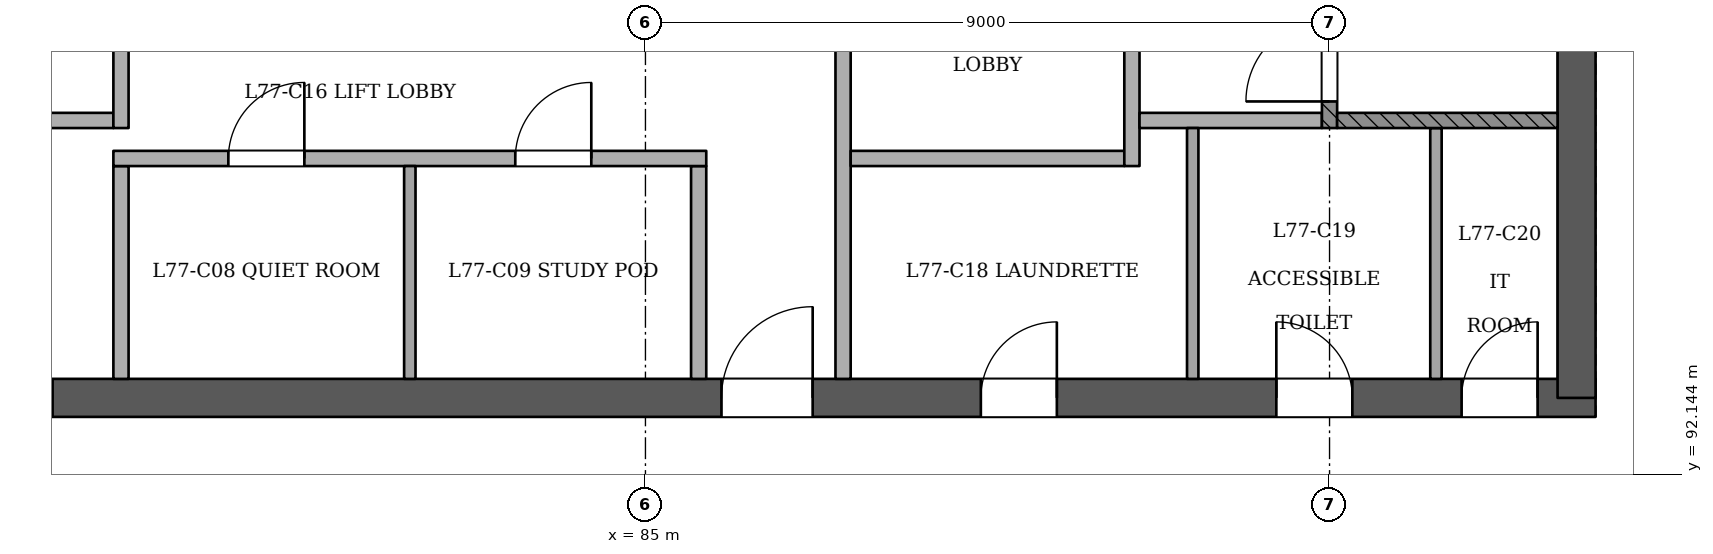
"""IFC4 building model, lengths in metres.
Left out: names, types, materials, properties, quantities, classifications, styles, units other than length and angle.
Written with IfcOpenShell. Run it as: python <this file> out.ifc"""

import sys

from ifc_helpers import new_model, si_unit, direction, frame, frame_2d, origin, place, context, subcontext, project, spatial, rectangle, extrude, element, fill, save


model = new_model("IFC4")
c1 = context("Model", 3, precision=1e-05, world=origin(), true_north=direction((0.0, 1.0)))
c2 = subcontext(c1, "Body", "Model", "MODEL_VIEW")
j1 = project(units=[si_unit("LENGTHUNIT", "METRE"), si_unit("PLANEANGLEUNIT", "RADIAN")], contexts=[c1])
p1 = place(None, origin())
s1 = spatial("IfcSite", under=j1, at=p1, CompositionType="ELEMENT")
p2 = place(p1, origin())
s2 = spatial("IfcBuilding", under=s1, at=p2, CompositionType="ELEMENT")
p3 = place(p2, frame((0.0, 0.0, 298.6)))
s3 = spatial("IfcBuildingStorey", under=s2, at=p3, CompositionType="ELEMENT", Elevation=298.6)
p4 = place(p3, frame((72.75, 93.15, 0.0), z_axis=(0.0, 0.0, 1.0), x_axis=(1.0, 0.0, 0.0)))
e1 = element("IfcWall", 1, at=p4, inside=s3, PredefinedType="SHEAR", context=c2, shape_type="SweptSolid", body=[
    extrude(rectangle(XDim=24.75, YDim=0.5, at=frame_2d((12.375, 0.0))), origin(), (0.0, 0.0, 1.0), 3.6),
])
p5 = place(p4, frame((1.05, 0.0, 0.0)))
e2 = element("IfcOpeningElement", 2, at=p5, cuts=e1, PredefinedType="OPENING", context=c2, shape_type="SweptSolid", body=[
    extrude(rectangle(XDim=1.2, YDim=2.1, at=frame_2d((0.6, 1.05))), frame((0.0, 0.26, 0.0), z_axis=(0.0, -1.0, 0.0), x_axis=(1.0, 0.0, 0.0)), (0.0, 0.0, 1.0), 0.521),
])
p6 = place(p4, frame((3.25, 0.0, 0.0)))
e3 = element("IfcOpeningElement", 3, at=p6, cuts=e1, PredefinedType="OPENING", context=c2, shape_type="SweptSolid", body=[
    extrude(rectangle(XDim=1.2, YDim=2.1, at=frame_2d((0.6, 1.05))), frame((0.0, 0.26, 0.0), z_axis=(0.0, -1.0, 0.0), x_axis=(1.0, 0.0, 0.0)), (0.0, 0.0, 1.0), 0.521),
])
p7 = place(p4, frame((13.25, 0.0, 0.0)))
e4 = element("IfcOpeningElement", 4, at=p7, cuts=e1, PredefinedType="OPENING", context=c2, shape_type="SweptSolid", body=[
    extrude(rectangle(XDim=1.2, YDim=2.1, at=frame_2d((0.6, 1.05))), frame((0.0, 0.26, 0.0), z_axis=(0.0, -1.0, 0.0), x_axis=(1.0, 0.0, 0.0)), (0.0, 0.0, 1.0), 0.521),
])
p8 = place(p4, frame((16.663, 0.0, 0.0)))
e5 = element("IfcOpeningElement", 5, at=p8, cuts=e1, PredefinedType="OPENING", context=c2, shape_type="SweptSolid", body=[
    extrude(rectangle(XDim=1.0, YDim=2.1, at=frame_2d((0.5, 1.05))), frame((0.0, 0.26, 0.0), z_axis=(0.0, -1.0, 0.0), x_axis=(1.0, 0.0, 0.0)), (0.0, 0.0, 1.0), 0.521),
])
p9 = place(p4, frame((20.55, 0.0, 0.0)))
e6 = element("IfcOpeningElement", 6, at=p9, cuts=e1, PredefinedType="OPENING", context=c2, shape_type="SweptSolid", body=[
    extrude(rectangle(XDim=1.0, YDim=2.1, at=frame_2d((0.5, 1.05))), frame((0.0, 0.26, 0.0), z_axis=(0.0, -1.0, 0.0), x_axis=(1.0, 0.0, 0.0)), (0.0, 0.0, 1.0), 0.521),
])
p10 = place(p4, frame((22.988, 0.0, 0.0)))
e7 = element("IfcOpeningElement", 7, at=p10, cuts=e1, PredefinedType="OPENING", context=c2, shape_type="SweptSolid", body=[
    extrude(rectangle(XDim=1.0, YDim=2.1, at=frame_2d((0.5, 1.05))), frame((0.0, 0.26, 0.0), z_axis=(0.0, -1.0, 0.0), x_axis=(1.0, 0.0, 0.0)), (0.0, 0.0, 1.0), 0.521),
])
p11 = place(p3, frame((97.25, 93.15, 0.0), z_axis=(0.0, 0.0, 1.0), x_axis=(0.0, 1.0, 0.0)))
e8 = element("IfcWall", 8, at=p11, inside=s3, PredefinedType="SHEAR", context=c2, shape_type="SweptSolid", body=[
    extrude(rectangle(XDim=10.75, YDim=0.5, at=frame_2d((5.375, 0.0))), origin(), (0.0, 0.0, 1.0), 3.6),
])
p12 = place(p3, frame((78.1, 93.4, 0.0), z_axis=(0.0, 0.0, 1.0), x_axis=(0.0, 1.0, 0.0)))
e9 = element("IfcWall", 9, at=p12, inside=s3, PredefinedType="PARTITIONING", context=c2, shape_type="SweptSolid", body=[
    extrude(rectangle(XDim=2.8, YDim=0.2, at=frame_2d((1.4, 0.0))), origin(), (0.0, 0.0, 1.0), 3.2),
])
p13 = place(p3, frame((81.9, 93.4, 0.0), z_axis=(0.0, 0.0, 1.0), x_axis=(0.0, 1.0, 0.0)))
e10 = element("IfcWall", 10, at=p13, inside=s3, PredefinedType="PARTITIONING", context=c2, shape_type="SweptSolid", body=[
    extrude(rectangle(XDim=2.8, YDim=0.15, at=frame_2d((1.4, 0.0))), origin(), (0.0, 0.0, 1.0), 3.2),
])
p14 = place(p3, frame((85.7, 93.4, 0.0), z_axis=(0.0, 0.0, 1.0), x_axis=(0.0, 1.0, 0.0)))
e11 = element("IfcWall", 11, at=p14, inside=s3, PredefinedType="PARTITIONING", context=c2, shape_type="SweptSolid", body=[
    extrude(rectangle(XDim=2.8, YDim=0.2, at=frame_2d((1.4, 0.0))), origin(), (0.0, 0.0, 1.0), 3.2),
])
p15 = place(p3, frame((87.6, 93.4, 0.0), z_axis=(0.0, 0.0, 1.0), x_axis=(0.0, 1.0, 0.0)))
e12 = element("IfcWall", 12, at=p15, inside=s3, PredefinedType="PARTITIONING", context=c2, shape_type="SweptSolid", body=[
    extrude(rectangle(XDim=7.0, YDim=0.2, at=frame_2d((3.5, 0.0))), origin(), (0.0, 0.0, 1.0), 3.2),
])
p16 = place(p15, frame((4.45, 0.0, 0.0)))
e13 = element("IfcOpeningElement", 13, at=p16, cuts=e12, PredefinedType="OPENING", context=c2, shape_type="SweptSolid", body=[
    extrude(rectangle(XDim=1.1, YDim=2.1, at=frame_2d((0.55, 1.05))), frame((0.0, 0.11, 0.0), z_axis=(0.0, -1.0, 0.0), x_axis=(1.0, 0.0, 0.0)), (0.0, 0.0, 1.0), 0.221),
])
for number, where, z_axis, x_axis in (
    (14, (92.2, 93.4, 0.0), (0.0, 0.0, 1.0), (0.0, 1.0, 0.0)),
    (15, (95.4, 93.4, 0.0), (0.0, 0.0, 1.0), (0.0, 1.0, 0.0)),
):
    element("IfcWall", number, at=place(p3, frame(where, z_axis=z_axis, x_axis=x_axis)), inside=s3, PredefinedType="PARTITIONING", context=c2, shape_type="SweptSolid", body=[
        extrude(rectangle(XDim=3.3, YDim=0.15, at=frame_2d((1.65, 0.0))), origin(), (0.0, 0.0, 1.0), 3.2),
    ])
p17 = place(p3, frame((78.0, 96.3, 0.0), z_axis=(0.0, 0.0, 1.0), x_axis=(1.0, 0.0, 0.0)))
e16 = element("IfcWall", 16, at=p17, inside=s3, PredefinedType="PARTITIONING", context=c2, shape_type="SweptSolid", body=[
    extrude(rectangle(XDim=7.8, YDim=0.2, at=frame_2d((3.9, 0.0))), origin(), (0.0, 0.0, 1.0), 3.2),
])
p18 = place(p17, frame((1.512, 0.0, 0.0)))
e17 = element("IfcOpeningElement", 17, at=p18, cuts=e16, PredefinedType="OPENING", context=c2, shape_type="SweptSolid", body=[
    extrude(rectangle(XDim=1.0, YDim=2.1, at=frame_2d((0.5, 1.05))), frame((0.0, 0.11, 0.0), z_axis=(0.0, -1.0, 0.0), x_axis=(1.0, 0.0, 0.0)), (0.0, 0.0, 1.0), 0.221),
])
p19 = place(p17, frame((5.288, 0.0, 0.0)))
e18 = element("IfcOpeningElement", 18, at=p19, cuts=e16, PredefinedType="OPENING", context=c2, shape_type="SweptSolid", body=[
    extrude(rectangle(XDim=1.0, YDim=2.1, at=frame_2d((0.5, 1.05))), frame((0.0, 0.11, 0.0), z_axis=(0.0, -1.0, 0.0), x_axis=(1.0, 0.0, 0.0)), (0.0, 0.0, 1.0), 0.221),
])
p20 = place(p3, frame((87.7, 96.3, 0.0), z_axis=(0.0, 0.0, 1.0), x_axis=(1.0, 0.0, 0.0)))
e19 = element("IfcWall", 19, at=p20, inside=s3, PredefinedType="PARTITIONING", context=c2, shape_type="SweptSolid", body=[
    extrude(rectangle(XDim=3.6, YDim=0.2, at=frame_2d((1.8, 0.0))), origin(), (0.0, 0.0, 1.0), 3.2),
])
p21 = place(p3, frame((91.4, 96.2, 0.0), z_axis=(0.0, 0.0, 1.0), x_axis=(0.0, 1.0, 0.0)))
e20 = element("IfcWall", 20, at=p21, inside=s3, PredefinedType="PARTITIONING", context=c2, shape_type="SweptSolid", body=[
    extrude(rectangle(XDim=4.2, YDim=0.2, at=frame_2d((2.1, 0.0))), origin(), (0.0, 0.0, 1.0), 3.2),
])
p22 = place(p21, frame((2.45, 0.0, 0.0)))
e21 = element("IfcOpeningElement", 21, at=p22, cuts=e20, PredefinedType="OPENING", context=c2, shape_type="SweptSolid", body=[
    extrude(rectangle(XDim=1.1, YDim=2.1, at=frame_2d((0.55, 1.05))), frame((0.0, 0.11, 0.0), z_axis=(0.0, -1.0, 0.0), x_axis=(1.0, 0.0, 0.0)), (0.0, 0.0, 1.0), 0.221),
])
p23 = place(p3, frame((76.1, 96.8, 0.0), z_axis=(0.0, 0.0, 1.0), x_axis=(1.0, 0.0, 0.0)))
e22 = element("IfcWall", 22, at=p23, inside=s3, PredefinedType="PARTITIONING", context=c2, shape_type="SweptSolid", body=[
    extrude(rectangle(XDim=1.9, YDim=0.2, at=frame_2d((0.95, 0.0))), origin(), (0.0, 0.0, 1.0), 3.2),
])
p24 = place(p3, frame((78.1, 96.7, 0.0), z_axis=(0.0, 0.0, 1.0), x_axis=(0.0, 1.0, 0.0)))
e23 = element("IfcWall", 23, at=p24, inside=s3, PredefinedType="PARTITIONING", context=c2, shape_type="SweptSolid", body=[
    extrude(rectangle(XDim=3.7, YDim=0.2, at=frame_2d((1.85, 0.0))), origin(), (0.0, 0.0, 1.0), 3.2),
])
p25 = place(p24, frame((1.95, 0.0, 0.0)))
e24 = element("IfcOpeningElement", 24, at=p25, cuts=e23, PredefinedType="OPENING", context=c2, shape_type="SweptSolid", body=[
    extrude(rectangle(XDim=1.1, YDim=2.1, at=frame_2d((0.55, 1.05))), frame((0.0, 0.11, 0.0), z_axis=(0.0, -1.0, 0.0), x_axis=(1.0, 0.0, 0.0)), (0.0, 0.0, 1.0), 0.221),
])
p26 = place(p3, frame((91.5, 96.8, 0.0), z_axis=(0.0, 0.0, 1.0), x_axis=(1.0, 0.0, 0.0)))
e25 = element("IfcWall", 25, at=p26, inside=s3, PredefinedType="PARTITIONING", context=c2, shape_type="SweptSolid", body=[
    extrude(rectangle(XDim=2.4, YDim=0.2, at=frame_2d((1.2, 0.0))), origin(), (0.0, 0.0, 1.0), 3.2),
])
p27 = place(p3, frame((94.0, 96.7, 0.0), z_axis=(0.0, 0.0, 1.0), x_axis=(0.0, 1.0, 0.0)))
e26 = element("IfcWall", 26, at=p27, inside=s3, PredefinedType="SOLIDWALL", context=c2, shape_type="SweptSolid", body=[
    extrude(rectangle(XDim=3.7, YDim=0.2, at=frame_2d((1.85, 0.0))), origin(), (0.0, 0.0, 1.0), 3.2),
])
p28 = place(p27, frame((0.35, 0.0, 0.0)))
e27 = element("IfcOpeningElement", 27, at=p28, cuts=e26, PredefinedType="OPENING", context=c2, shape_type="SweptSolid", body=[
    extrude(rectangle(XDim=1.1, YDim=2.1, at=frame_2d((0.55, 1.05))), frame((0.0, 0.11, 0.0), z_axis=(0.0, -1.0, 0.0), x_axis=(1.0, 0.0, 0.0)), (0.0, 0.0, 1.0), 0.221),
])
p29 = place(p3, frame((94.1, 96.8, 0.0), z_axis=(0.0, 0.0, 1.0), x_axis=(1.0, 0.0, 0.0)))
e28 = element("IfcWall", 28, at=p29, inside=s3, PredefinedType="SOLIDWALL", context=c2, shape_type="SweptSolid", body=[
    extrude(rectangle(XDim=2.9, YDim=0.2, at=frame_2d((1.45, 0.0))), origin(), (0.0, 0.0, 1.0), 3.2),
])
p30 = place(p28, origin())
e29 = element("IfcDoor", 29, at=p30, inside=s3, OperationType="SINGLE_SWING_LEFT", PredefinedType="NOTDEFINED", context=c2, shape_type="SweptSolid", body=[
    extrude(rectangle(XDim=1.1, YDim=2.1, at=frame_2d((0.55, 1.05))), frame((0.0, 0.025, 0.0), z_axis=(0.0, -1.0, 0.0), x_axis=(1.0, 0.0, 0.0)), (0.0, 0.0, 1.0), 0.05),
])
fill(e27, e29)
p31 = place(p6, origin())
e30 = element("IfcDoor", 30, at=p31, inside=s3, OperationType="SINGLE_SWING_LEFT", PredefinedType="NOTDEFINED", context=c2, shape_type="SweptSolid", body=[
    extrude(rectangle(XDim=1.2, YDim=2.1, at=frame_2d((0.6, 1.05))), frame((0.0, 0.025, 0.0), z_axis=(0.0, -1.0, 0.0), x_axis=(1.0, 0.0, 0.0)), (0.0, 0.0, 1.0), 0.05),
])
fill(e3, e30)
p32 = place(p7, origin())
e31 = element("IfcDoor", 31, at=p32, inside=s3, OperationType="SINGLE_SWING_RIGHT", PredefinedType="NOTDEFINED", context=c2, shape_type="SweptSolid", body=[
    extrude(rectangle(XDim=1.2, YDim=2.1, at=frame_2d((0.6, 1.05))), frame((0.0, 0.025, 0.0), z_axis=(0.0, -1.0, 0.0), x_axis=(1.0, 0.0, 0.0)), (0.0, 0.0, 1.0), 0.05),
])
fill(e4, e31)
p33 = place(p8, origin())
e32 = element("IfcDoor", 32, at=p33, inside=s3, OperationType="SINGLE_SWING_RIGHT", PredefinedType="NOTDEFINED", context=c2, shape_type="SweptSolid", body=[
    extrude(rectangle(XDim=1.0, YDim=2.1, at=frame_2d((0.5, 1.05))), frame((0.0, 0.025, 0.0), z_axis=(0.0, -1.0, 0.0), x_axis=(1.0, 0.0, 0.0)), (0.0, 0.0, 1.0), 0.05),
])
fill(e5, e32)
p34 = place(p9, origin())
e33 = element("IfcDoor", 33, at=p34, inside=s3, OperationType="SINGLE_SWING_LEFT", PredefinedType="NOTDEFINED", context=c2, shape_type="SweptSolid", body=[
    extrude(rectangle(XDim=1.0, YDim=2.1, at=frame_2d((0.5, 1.05))), frame((0.0, 0.025, 0.0), z_axis=(0.0, -1.0, 0.0), x_axis=(1.0, 0.0, 0.0)), (0.0, 0.0, 1.0), 0.05),
])
fill(e6, e33)
p35 = place(p10, origin())
e34 = element("IfcDoor", 34, at=p35, inside=s3, OperationType="SINGLE_SWING_RIGHT", PredefinedType="NOTDEFINED", context=c2, shape_type="SweptSolid", body=[
    extrude(rectangle(XDim=1.0, YDim=2.1, at=frame_2d((0.5, 1.05))), frame((0.0, 0.025, 0.0), z_axis=(0.0, -1.0, 0.0), x_axis=(1.0, 0.0, 0.0)), (0.0, 0.0, 1.0), 0.05),
])
fill(e7, e34)
p36 = place(p18, origin())
e35 = element("IfcDoor", 35, at=p36, inside=s3, OperationType="SINGLE_SWING_RIGHT", PredefinedType="NOTDEFINED", context=c2, shape_type="SweptSolid", body=[
    extrude(rectangle(XDim=1.0, YDim=2.1, at=frame_2d((0.5, 1.05))), frame((0.0, 0.025, 0.0), z_axis=(0.0, -1.0, 0.0), x_axis=(1.0, 0.0, 0.0)), (0.0, 0.0, 1.0), 0.05),
])
fill(e17, e35)
p37 = place(p19, origin())
e36 = element("IfcDoor", 36, at=p37, inside=s3, OperationType="SINGLE_SWING_RIGHT", PredefinedType="NOTDEFINED", context=c2, shape_type="SweptSolid", body=[
    extrude(rectangle(XDim=1.0, YDim=2.1, at=frame_2d((0.5, 1.05))), frame((0.0, 0.025, 0.0), z_axis=(0.0, -1.0, 0.0), x_axis=(1.0, 0.0, 0.0)), (0.0, 0.0, 1.0), 0.05),
])
fill(e18, e36)
save(model, sys.argv[1])
